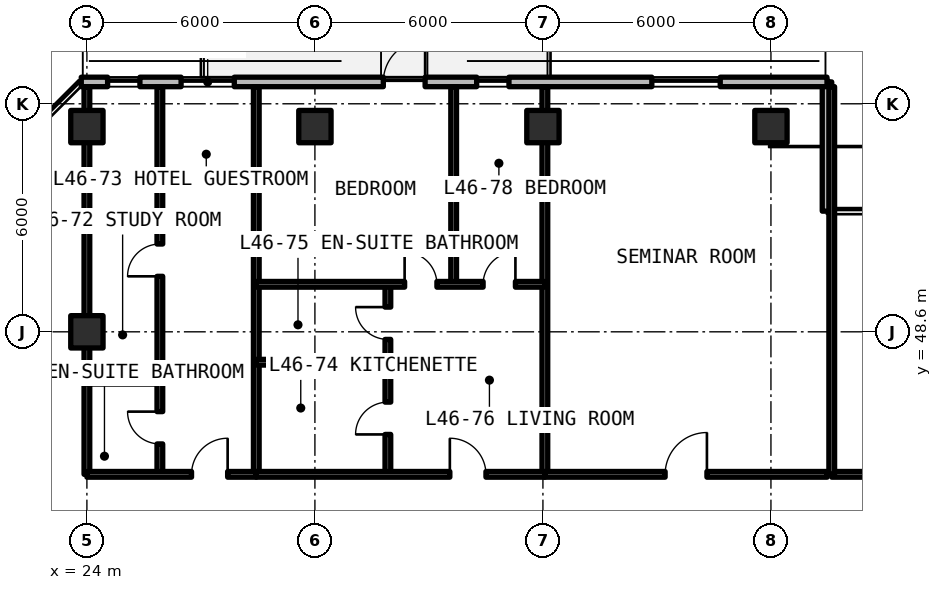
"""IFC4 building model, lengths in metres.
Left out: names, types, materials, properties, quantities, classifications, styles, units other than length and angle.
Written with IfcOpenShell. Run it as: python <this file> out.ifc"""

import sys

from ifc_helpers import new_model, si_unit, direction, frame, frame_2d, origin, origin_2d, place, context, subcontext, project, spatial, rectangle, extrude, element, fill, save


model = new_model("IFC4")
c1 = context("Model", 3, precision=1e-05, world=origin(), true_north=direction((0.0, 1.0)))
c2 = subcontext(c1, "Body", "Model", "MODEL_VIEW")
j1 = project(units=[si_unit("LENGTHUNIT", "METRE"), si_unit("PLANEANGLEUNIT", "RADIAN")], contexts=[c1])
p1 = place(None, origin())
s1 = spatial("IfcSite", under=j1, at=p1, CompositionType="ELEMENT")
p2 = place(p1, origin())
s2 = spatial("IfcBuilding", under=s1, at=p2, CompositionType="ELEMENT")
p3 = place(p2, frame((0.0, 0.0, 165.66)))
s3 = spatial("IfcBuildingStorey", under=s2, at=p3, CompositionType="ELEMENT", Elevation=165.66)
for number, where, z_axis, x_axis in (
    (1, (24.0, 48.6, 0.0), (0.0, 0.0, 1.0), (1.0, 0.0, 0.0)),
    (2, (24.0, 54.0, 0.0), (0.0, 0.0, 1.0), (1.0, 0.0, 0.0)),
    (3, (30.0, 54.0, 0.0), (0.0, 0.0, 1.0), (1.0, 0.0, 0.0)),
    (4, (36.0, 54.0, 0.0), (0.0, 0.0, 1.0), (1.0, 0.0, 0.0)),
    (5, (42.0, 54.0, 0.0), (0.0, 0.0, 1.0), (1.0, 0.0, 0.0)),
):
    element("IfcColumn", number, at=place(p3, frame(where, z_axis=z_axis, x_axis=x_axis)), inside=s3, PredefinedType="COLUMN", context=c2, shape_type="SweptSolid", body=[
        extrude(rectangle(XDim=0.85, YDim=0.85, at=origin_2d()), origin(), (0.0, 0.0, 1.0), 3.63),
    ])
p4 = place(p3, frame((43.475, 51.775, 0.0), z_axis=(0.0, 0.0, 1.0), x_axis=(0.0, 1.0, 0.0)))
e6 = element("IfcWall", 6, at=p4, inside=s3, PredefinedType="SOLIDWALL", context=c2, shape_type="SweptSolid", body=[
    extrude(rectangle(XDim=3.4, YDim=0.25, at=frame_2d((1.7, 0.0))), origin(), (0.0, 0.0, 1.0), 3.41),
])
p5 = place(p3, frame((43.475, 55.175, 0.0), z_axis=(0.0, 0.0, 1.0), x_axis=(-1.0, 0.0, 0.0)))
e7 = element("IfcWall", 7, at=p5, inside=s3, PredefinedType="SOLIDWALL", context=c2, shape_type="SweptSolid", body=[
    extrude(rectangle(XDim=19.623, YDim=0.25, at=frame_2d((9.812, 0.0))), origin(), (0.0, 0.0, 1.0), 3.41),
])
p6 = place(p5, frame((10.575, 0.0, 0.0)))
e8 = element("IfcOpeningElement", 8, at=p6, cuts=e7, PredefinedType="OPENING", context=c2, shape_type="SweptSolid", body=[
    extrude(rectangle(XDim=1.1, YDim=2.15, at=frame_2d((0.55, 1.075))), frame((0.0, 0.135, 0.0), z_axis=(0.0, -1.0, 0.0), x_axis=(1.0, 0.0, 0.0)), (0.0, 0.0, 1.0), 0.27),
])
p7 = place(p5, frame((18.08, 0.0, 0.78)))
e9 = element("IfcOpeningElement", 9, at=p7, cuts=e7, PredefinedType="OPENING", context=c2, shape_type="SweptSolid", body=[
    extrude(rectangle(XDim=0.85, YDim=1.65, at=frame_2d((0.425, 0.825))), frame((0.0, 0.135, 0.0), z_axis=(0.0, -1.0, 0.0), x_axis=(1.0, 0.0, 0.0)), (0.0, 0.0, 1.0), 0.27),
])
p8 = place(p5, frame((15.596, 0.0, 0.78)))
e10 = element("IfcOpeningElement", 10, at=p8, cuts=e7, PredefinedType="OPENING", context=c2, shape_type="SweptSolid", body=[
    extrude(rectangle(XDim=1.4, YDim=1.65, at=frame_2d((0.7, 0.825))), frame((0.0, 0.135, 0.0), z_axis=(0.0, -1.0, 0.0), x_axis=(1.0, 0.0, 0.0)), (0.0, 0.0, 1.0), 0.27),
])
p9 = place(p5, frame((8.369, 0.0, 0.78)))
e11 = element("IfcOpeningElement", 11, at=p9, cuts=e7, PredefinedType="OPENING", context=c2, shape_type="SweptSolid", body=[
    extrude(rectangle(XDim=0.85, YDim=1.65, at=frame_2d((0.425, 0.825))), frame((0.0, 0.135, 0.0), z_axis=(0.0, -1.0, 0.0), x_axis=(1.0, 0.0, 0.0)), (0.0, 0.0, 1.0), 0.27),
])
p10 = place(p5, frame((2.809, 0.0, 0.78)))
e12 = element("IfcOpeningElement", 12, at=p10, cuts=e7, PredefinedType="OPENING", context=c2, shape_type="SweptSolid", body=[
    extrude(rectangle(XDim=1.8, YDim=1.66, at=frame_2d((0.9, 0.83))), frame((0.0, 0.135, 0.0), z_axis=(0.0, -1.0, 0.0), x_axis=(1.0, 0.0, 0.0)), (0.0, 0.0, 1.0), 0.27),
])
p11 = place(p3, frame((43.6, 44.85, 0.0), z_axis=(0.0, 0.0, 1.0), x_axis=(1.0, 0.0, 0.0)))
e13 = element("IfcWall", 13, at=p11, inside=s3, PredefinedType="SOLIDWALL", context=c2, shape_type="SweptSolid", body=[
    extrude(rectangle(XDim=8.4, YDim=0.15, at=frame_2d((4.2, 0.0))), origin(), (0.0, 0.0, 1.0), 2.63),
])
p12 = place(p11, frame((3.65, 0.0, 0.0)))
e14 = element("IfcOpeningElement", 14, at=p12, cuts=e13, PredefinedType="OPENING", context=c2, shape_type="SweptSolid", body=[
    extrude(rectangle(XDim=1.1, YDim=2.15, at=frame_2d((0.55, 1.075))), frame((0.0, 0.085, 0.0), z_axis=(0.0, -1.0, 0.0), x_axis=(1.0, 0.0, 0.0)), (0.0, 0.0, 1.0), 0.17),
])
for number, where, z_axis, x_axis in (
    (15, (43.6, 44.85, 0.0), (0.0, 0.0, 1.0), (0.0, 1.0, 0.0)),
    (16, (24.0, 44.85, 0.0), (0.0, 0.0, 1.0), (0.0, 1.0, 0.0)),
    (17, (28.457, 44.85, 0.0), (0.0, 0.0, 1.0), (0.0, 1.0, 0.0)),
):
    element("IfcWall", number, at=place(p3, frame(where, z_axis=z_axis, x_axis=x_axis)), inside=s3, PredefinedType="SOLIDWALL", context=c2, shape_type="SweptSolid", body=[
        extrude(rectangle(XDim=10.2, YDim=0.15, at=frame_2d((5.1, 0.0))), origin(), (0.0, 0.0, 1.0), 2.63),
    ])
p13 = place(p3, frame((24.0, 47.3, 0.0), z_axis=(0.0, 0.0, 1.0), x_axis=(1.0, 0.0, 0.0)))
e18 = element("IfcWall", 18, at=p13, inside=s3, PredefinedType="PARTITIONING", context=c2, shape_type="SweptSolid", body=[
    extrude(rectangle(XDim=1.92, YDim=0.15, at=frame_2d((0.96, 0.0))), origin(), (0.0, 0.0, 1.0), 2.63),
])
p14 = place(p3, frame((25.92, 44.85, 0.0), z_axis=(0.0, 0.0, 1.0), x_axis=(0.0, 1.0, 0.0)))
e19 = element("IfcWall", 19, at=p14, inside=s3, PredefinedType="PARTITIONING", context=c2, shape_type="SweptSolid", body=[
    extrude(rectangle(XDim=10.2, YDim=0.15, at=frame_2d((5.1, 0.0))), origin(), (0.0, 0.0, 1.0), 2.63),
])
p15 = place(p14, frame((0.8, 0.0, 0.0)))
e20 = element("IfcOpeningElement", 20, at=p15, cuts=e19, PredefinedType="OPENING", context=c2, shape_type="SweptSolid", body=[
    extrude(rectangle(XDim=0.85, YDim=2.1, at=frame_2d((0.425, 1.05))), frame((0.0, 0.085, 0.0), z_axis=(0.0, -1.0, 0.0), x_axis=(1.0, 0.0, 0.0)), (0.0, 0.0, 1.0), 0.17),
])
p16 = place(p14, frame((5.21, 0.0, 0.0)))
e21 = element("IfcOpeningElement", 21, at=p16, cuts=e19, PredefinedType="OPENING", context=c2, shape_type="SweptSolid", body=[
    extrude(rectangle(XDim=0.85, YDim=2.1, at=frame_2d((0.425, 1.05))), frame((0.0, 0.085, 0.0), z_axis=(0.0, -1.0, 0.0), x_axis=(1.0, 0.0, 0.0)), (0.0, 0.0, 1.0), 0.17),
])
p17 = place(p3, frame((24.0, 44.85, 0.0), z_axis=(0.0, 0.0, 1.0), x_axis=(1.0, 0.0, 0.0)))
e22 = element("IfcWall", 22, at=p17, inside=s3, PredefinedType="SOLIDWALL", context=c2, shape_type="SweptSolid", body=[
    extrude(rectangle(XDim=4.457, YDim=0.15, at=frame_2d((2.229, 0.0))), origin(), (0.0, 0.0, 1.0), 2.63),
])
p18 = place(p17, frame((2.754, 0.0, 0.0)))
e23 = element("IfcOpeningElement", 23, at=p18, cuts=e22, PredefinedType="OPENING", context=c2, shape_type="SweptSolid", body=[
    extrude(rectangle(XDim=0.95, YDim=2.15, at=frame_2d((0.475, 1.075))), frame((0.0, 0.085, 0.0), z_axis=(0.0, -1.0, 0.0), x_axis=(1.0, 0.0, 0.0)), (0.0, 0.0, 1.0), 0.17),
])
p19 = place(p3, frame((36.051, 44.85, 0.0), z_axis=(0.0, 0.0, 1.0), x_axis=(0.0, 1.0, 0.0)))
e24 = element("IfcWall", 24, at=p19, inside=s3, PredefinedType="SOLIDWALL", context=c2, shape_type="SweptSolid", body=[
    extrude(rectangle(XDim=10.2, YDim=0.15, at=frame_2d((5.1, 0.0))), origin(), (0.0, 0.0, 1.0), 2.63),
])
p20 = place(p3, frame((28.457, 47.8, 0.0), z_axis=(0.0, 0.0, 1.0), x_axis=(1.0, 0.0, 0.0)))
e25 = element("IfcWall", 25, at=p20, inside=s3, PredefinedType="PARTITIONING", context=c2, shape_type="SweptSolid", body=[
    extrude(rectangle(XDim=3.463, YDim=0.15, at=frame_2d((1.731, 0.0))), origin(), (0.0, 0.0, 1.0), 2.63),
])
p21 = place(p3, frame((31.92, 44.85, 0.0), z_axis=(0.0, 0.0, 1.0), x_axis=(0.0, 1.0, 0.0)))
e26 = element("IfcWall", 26, at=p21, inside=s3, PredefinedType="PARTITIONING", context=c2, shape_type="SweptSolid", body=[
    extrude(rectangle(XDim=5.0, YDim=0.15, at=frame_2d((2.5, 0.0))), origin(), (0.0, 0.0, 1.0), 2.63),
])
p22 = place(p21, frame((1.05, 0.0, 0.0)))
e27 = element("IfcOpeningElement", 27, at=p22, cuts=e26, PredefinedType="OPENING", context=c2, shape_type="SweptSolid", body=[
    extrude(rectangle(XDim=0.85, YDim=2.1, at=frame_2d((0.425, 1.05))), frame((0.0, 0.085, 0.0), z_axis=(0.0, -1.0, 0.0), x_axis=(1.0, 0.0, 0.0)), (0.0, 0.0, 1.0), 0.17),
])
p23 = place(p21, frame((3.55, 0.0, 0.0)))
e28 = element("IfcOpeningElement", 28, at=p23, cuts=e26, PredefinedType="OPENING", context=c2, shape_type="SweptSolid", body=[
    extrude(rectangle(XDim=0.85, YDim=2.1, at=frame_2d((0.425, 1.05))), frame((0.0, 0.085, 0.0), z_axis=(0.0, -1.0, 0.0), x_axis=(1.0, 0.0, 0.0)), (0.0, 0.0, 1.0), 0.17),
])
p24 = place(p3, frame((33.651, 49.85, 0.0), z_axis=(0.0, 0.0, 1.0), x_axis=(0.0, 1.0, 0.0)))
e29 = element("IfcWall", 29, at=p24, inside=s3, PredefinedType="PARTITIONING", context=c2, shape_type="SweptSolid", body=[
    extrude(rectangle(XDim=5.2, YDim=0.15, at=frame_2d((2.6, 0.0))), origin(), (0.0, 0.0, 1.0), 2.63),
])
p25 = place(p3, frame((28.457, 49.85, 0.0), z_axis=(0.0, 0.0, 1.0), x_axis=(1.0, 0.0, 0.0)))
e30 = element("IfcWall", 30, at=p25, inside=s3, PredefinedType="PARTITIONING", context=c2, shape_type="SweptSolid", body=[
    extrude(rectangle(XDim=7.594, YDim=0.15, at=frame_2d((3.797, 0.0))), origin(), (0.0, 0.0, 1.0), 2.63),
])
p26 = place(p25, frame((3.903, 0.0, 0.0)))
e31 = element("IfcOpeningElement", 31, at=p26, cuts=e30, PredefinedType="OPENING", context=c2, shape_type="SweptSolid", body=[
    extrude(rectangle(XDim=0.85, YDim=2.1, at=frame_2d((0.425, 1.05))), frame((0.0, 0.085, 0.0), z_axis=(0.0, -1.0, 0.0), x_axis=(1.0, 0.0, 0.0)), (0.0, 0.0, 1.0), 0.17),
])
p27 = place(p25, frame((5.969, 0.0, 0.0)))
e32 = element("IfcOpeningElement", 32, at=p27, cuts=e30, PredefinedType="OPENING", context=c2, shape_type="SweptSolid", body=[
    extrude(rectangle(XDim=0.85, YDim=2.1, at=frame_2d((0.425, 1.05))), frame((0.0, 0.085, 0.0), z_axis=(0.0, -1.0, 0.0), x_axis=(1.0, 0.0, 0.0)), (0.0, 0.0, 1.0), 0.17),
])
p28 = place(p3, frame((28.457, 44.85, 0.0), z_axis=(0.0, 0.0, 1.0), x_axis=(1.0, 0.0, 0.0)))
e33 = element("IfcWall", 33, at=p28, inside=s3, PredefinedType="SOLIDWALL", context=c2, shape_type="SweptSolid", body=[
    extrude(rectangle(XDim=7.594, YDim=0.15, at=frame_2d((3.797, 0.0))), origin(), (0.0, 0.0, 1.0), 2.63),
])
p29 = place(p28, frame((5.093, 0.0, 0.0)))
e34 = element("IfcOpeningElement", 34, at=p29, cuts=e33, PredefinedType="OPENING", context=c2, shape_type="SweptSolid", body=[
    extrude(rectangle(XDim=0.95, YDim=2.15, at=frame_2d((0.475, 1.075))), frame((0.0, 0.085, 0.0), z_axis=(0.0, -1.0, 0.0), x_axis=(1.0, 0.0, 0.0)), (0.0, 0.0, 1.0), 0.17),
])
p30 = place(p3, frame((36.051, 44.85, 0.0), z_axis=(0.0, 0.0, 1.0), x_axis=(1.0, 0.0, 0.0)))
e35 = element("IfcWall", 35, at=p30, inside=s3, PredefinedType="SOLIDWALL", context=c2, shape_type="SweptSolid", body=[
    extrude(rectangle(XDim=7.429, YDim=0.15, at=frame_2d((3.714, 0.0))), origin(), (0.0, 0.0, 1.0), 2.63),
])
p31 = place(p30, frame((3.164, 0.0, 0.0)))
e36 = element("IfcOpeningElement", 36, at=p31, cuts=e35, PredefinedType="OPENING", context=c2, shape_type="SweptSolid", body=[
    extrude(rectangle(XDim=1.1, YDim=2.15, at=frame_2d((0.55, 1.075))), frame((0.0, 0.085, 0.0), z_axis=(0.0, -1.0, 0.0), x_axis=(1.0, 0.0, 0.0)), (0.0, 0.0, 1.0), 0.17),
])
p32 = place(p6, frame((1.1, 0.0, 0.0), z_axis=(0.0, 0.0, 1.0), x_axis=(-1.0, 0.0, 0.0)))
e37 = element("IfcDoor", 37, at=p32, inside=s3, OperationType="SINGLE_SWING_LEFT", PredefinedType="DOOR", context=c2, shape_type="SweptSolid", body=[
    extrude(rectangle(XDim=1.1, YDim=2.15, at=frame_2d((0.55, 1.075))), frame((0.0, 0.025, 0.0), z_axis=(0.0, -1.0, 0.0), x_axis=(1.0, 0.0, 0.0)), (0.0, 0.0, 1.0), 0.05),
])
fill(e8, e37)
p33 = place(p7, origin())
e38 = element("IfcWindow", 38, at=p33, inside=s3, PartitioningType="SINGLE_PANEL", PredefinedType="WINDOW", context=c2, shape_type="SweptSolid", body=[
    extrude(rectangle(XDim=0.85, YDim=1.65, at=frame_2d((0.425, 0.825))), frame((0.0, 0.03, 0.0), z_axis=(0.0, -1.0, 0.0), x_axis=(1.0, 0.0, 0.0)), (0.0, 0.0, 1.0), 0.06),
])
fill(e9, e38)
p34 = place(p8, origin())
e39 = element("IfcWindow", 39, at=p34, inside=s3, PartitioningType="SINGLE_PANEL", PredefinedType="WINDOW", context=c2, shape_type="SweptSolid", body=[
    extrude(rectangle(XDim=1.4, YDim=1.65, at=frame_2d((0.7, 0.825))), frame((0.0, 0.03, 0.0), z_axis=(0.0, -1.0, 0.0), x_axis=(1.0, 0.0, 0.0)), (0.0, 0.0, 1.0), 0.06),
])
fill(e10, e39)
p35 = place(p9, origin())
e40 = element("IfcWindow", 40, at=p35, inside=s3, PartitioningType="SINGLE_PANEL", PredefinedType="WINDOW", context=c2, shape_type="SweptSolid", body=[
    extrude(rectangle(XDim=0.85, YDim=1.65, at=frame_2d((0.425, 0.825))), frame((0.0, 0.03, 0.0), z_axis=(0.0, -1.0, 0.0), x_axis=(1.0, 0.0, 0.0)), (0.0, 0.0, 1.0), 0.06),
])
fill(e11, e40)
p36 = place(p10, origin())
e41 = element("IfcWindow", 41, at=p36, inside=s3, PartitioningType="SINGLE_PANEL", PredefinedType="WINDOW", context=c2, shape_type="SweptSolid", body=[
    extrude(rectangle(XDim=1.8, YDim=1.66, at=frame_2d((0.9, 0.83))), frame((0.0, 0.03, 0.0), z_axis=(0.0, -1.0, 0.0), x_axis=(1.0, 0.0, 0.0)), (0.0, 0.0, 1.0), 0.06),
])
fill(e12, e41)
p37 = place(p15, origin())
e42 = element("IfcDoor", 42, at=p37, inside=s3, OperationType="SINGLE_SWING_RIGHT", PredefinedType="DOOR", context=c2, shape_type="SweptSolid", body=[
    extrude(rectangle(XDim=0.85, YDim=2.1, at=frame_2d((0.425, 1.05))), frame((0.0, 0.025, 0.0), z_axis=(0.0, -1.0, 0.0), x_axis=(1.0, 0.0, 0.0)), (0.0, 0.0, 1.0), 0.05),
])
fill(e20, e42)
p38 = place(p16, origin())
e43 = element("IfcDoor", 43, at=p38, inside=s3, OperationType="SINGLE_SWING_LEFT", PredefinedType="DOOR", context=c2, shape_type="SweptSolid", body=[
    extrude(rectangle(XDim=0.85, YDim=2.1, at=frame_2d((0.425, 1.05))), frame((0.0, 0.025, 0.0), z_axis=(0.0, -1.0, 0.0), x_axis=(1.0, 0.0, 0.0)), (0.0, 0.0, 1.0), 0.05),
])
fill(e21, e43)
p39 = place(p18, origin())
e44 = element("IfcDoor", 44, at=p39, inside=s3, OperationType="SINGLE_SWING_RIGHT", PredefinedType="DOOR", context=c2, shape_type="SweptSolid", body=[
    extrude(rectangle(XDim=0.95, YDim=2.15, at=frame_2d((0.475, 1.075))), frame((0.0, 0.025, 0.0), z_axis=(0.0, -1.0, 0.0), x_axis=(1.0, 0.0, 0.0)), (0.0, 0.0, 1.0), 0.05),
])
fill(e23, e44)
p40 = place(p22, origin())
e45 = element("IfcDoor", 45, at=p40, inside=s3, OperationType="SINGLE_SWING_LEFT", PredefinedType="DOOR", context=c2, shape_type="SweptSolid", body=[
    extrude(rectangle(XDim=0.85, YDim=2.1, at=frame_2d((0.425, 1.05))), frame((0.0, 0.025, 0.0), z_axis=(0.0, -1.0, 0.0), x_axis=(1.0, 0.0, 0.0)), (0.0, 0.0, 1.0), 0.05),
])
fill(e27, e45)
p41 = place(p23, origin())
e46 = element("IfcDoor", 46, at=p41, inside=s3, OperationType="SINGLE_SWING_RIGHT", PredefinedType="DOOR", context=c2, shape_type="SweptSolid", body=[
    extrude(rectangle(XDim=0.85, YDim=2.1, at=frame_2d((0.425, 1.05))), frame((0.0, 0.025, 0.0), z_axis=(0.0, -1.0, 0.0), x_axis=(1.0, 0.0, 0.0)), (0.0, 0.0, 1.0), 0.05),
])
fill(e28, e46)
p42 = place(p26, origin())
e47 = element("IfcDoor", 47, at=p42, inside=s3, OperationType="SINGLE_SWING_LEFT", PredefinedType="DOOR", context=c2, shape_type="SweptSolid", body=[
    extrude(rectangle(XDim=0.85, YDim=2.1, at=frame_2d((0.425, 1.05))), frame((0.0, 0.025, 0.0), z_axis=(0.0, -1.0, 0.0), x_axis=(1.0, 0.0, 0.0)), (0.0, 0.0, 1.0), 0.05),
])
fill(e31, e47)
p43 = place(p27, origin())
e48 = element("IfcDoor", 48, at=p43, inside=s3, OperationType="SINGLE_SWING_RIGHT", PredefinedType="DOOR", context=c2, shape_type="SweptSolid", body=[
    extrude(rectangle(XDim=0.85, YDim=2.1, at=frame_2d((0.425, 1.05))), frame((0.0, 0.025, 0.0), z_axis=(0.0, -1.0, 0.0), x_axis=(1.0, 0.0, 0.0)), (0.0, 0.0, 1.0), 0.05),
])
fill(e32, e48)
p44 = place(p29, origin())
e49 = element("IfcDoor", 49, at=p44, inside=s3, OperationType="SINGLE_SWING_LEFT", PredefinedType="DOOR", context=c2, shape_type="SweptSolid", body=[
    extrude(rectangle(XDim=0.95, YDim=2.15, at=frame_2d((0.475, 1.075))), frame((0.0, 0.025, 0.0), z_axis=(0.0, -1.0, 0.0), x_axis=(1.0, 0.0, 0.0)), (0.0, 0.0, 1.0), 0.05),
])
fill(e34, e49)
p45 = place(p31, origin())
e50 = element("IfcDoor", 50, at=p45, inside=s3, OperationType="SINGLE_SWING_RIGHT", PredefinedType="DOOR", context=c2, shape_type="SweptSolid", body=[
    extrude(rectangle(XDim=1.1, YDim=2.15, at=frame_2d((0.55, 1.075))), frame((0.0, 0.025, 0.0), z_axis=(0.0, -1.0, 0.0), x_axis=(1.0, 0.0, 0.0)), (0.0, 0.0, 1.0), 0.05),
])
fill(e36, e50)
save(model, sys.argv[1])
